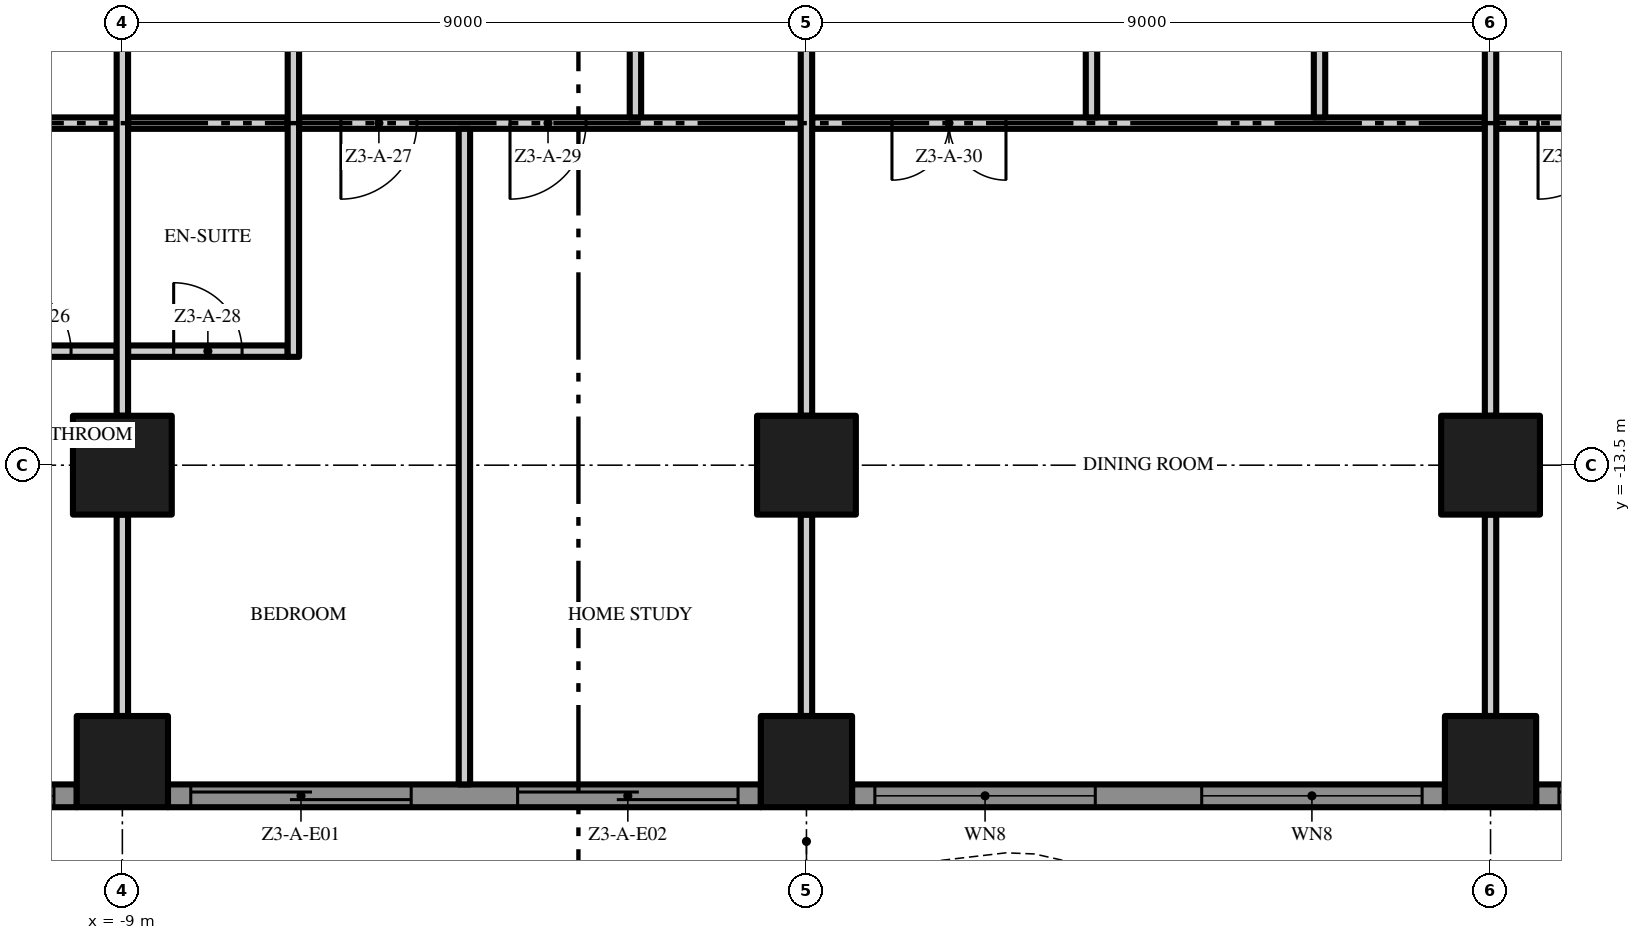
"""IFC4 building model, lengths in metres.
Left out: names, types, materials, properties, quantities, classifications, styles, units other than length and angle.
Written with IfcOpenShell. Run it as: python <this file> out.ifc"""

import sys

from ifc_helpers import new_model, si_unit, direction, frame, frame_2d, origin, origin_2d, place, context, subcontext, project, spatial, polyline, rectangle, outline, extrude, element, fill, save


model = new_model("IFC4")
c1 = context("Model", 3, precision=1e-05, world=origin(), true_north=direction((0.0, 1.0)))
c2 = subcontext(c1, "Body", "Model", "MODEL_VIEW")
j1 = project(units=[si_unit("LENGTHUNIT", "METRE"), si_unit("PLANEANGLEUNIT", "RADIAN")], contexts=[c1])
p1 = place(None, origin())
s1 = spatial("IfcSite", under=j1, at=p1, CompositionType="ELEMENT")
p2 = place(p1, origin())
s2 = spatial("IfcBuilding", under=s1, at=p2, CompositionType="ELEMENT")
p3 = place(p2, frame((0.0, 0.0, 125.0)))
s3 = spatial("IfcBuildingStorey", under=s2, at=p3, CompositionType="ELEMENT", Elevation=125.0)
p4 = place(p3, frame((-9.0, -13.5, 0.0), z_axis=(0.0, 0.0, 1.0), x_axis=(1.0, 0.0, 0.0)))
e1 = element("IfcColumn", 1, at=p4, inside=s3, PredefinedType="COLUMN", context=c2, shape_type="SweptSolid", body=[
    extrude(rectangle(XDim=1.3, YDim=1.3, at=origin_2d()), origin(), (0.0, 0.0, 1.0), 3.5),
])
p5 = place(p3, frame((-9.0, -17.4, 0.0), z_axis=(0.0, 0.0, 1.0), x_axis=(1.0, 0.0, 0.0)))
e2 = element("IfcColumn", 2, at=p5, inside=s3, PredefinedType="COLUMN", context=c2, shape_type="SweptSolid", body=[
    extrude(rectangle(XDim=1.2, YDim=1.2, at=origin_2d()), origin(), (0.0, 0.0, 1.0), 3.5),
])
p6 = place(p3, frame((0.0, -13.5, 0.0), z_axis=(0.0, 0.0, 1.0), x_axis=(1.0, 0.0, 0.0)))
e3 = element("IfcColumn", 3, at=p6, inside=s3, PredefinedType="COLUMN", context=c2, shape_type="SweptSolid", body=[
    extrude(rectangle(XDim=1.3, YDim=1.3, at=origin_2d()), origin(), (0.0, 0.0, 1.0), 3.5),
])
p7 = place(p3, frame((0.0, -17.4, 0.0), z_axis=(0.0, 0.0, 1.0), x_axis=(1.0, 0.0, 0.0)))
e4 = element("IfcColumn", 4, at=p7, inside=s3, PredefinedType="COLUMN", context=c2, shape_type="SweptSolid", body=[
    extrude(rectangle(XDim=1.2, YDim=1.2, at=origin_2d()), origin(), (0.0, 0.0, 1.0), 3.5),
])
p8 = place(p3, frame((9.0, -13.5, 0.0), z_axis=(0.0, 0.0, 1.0), x_axis=(1.0, 0.0, 0.0)))
e5 = element("IfcColumn", 5, at=p8, inside=s3, PredefinedType="COLUMN", context=c2, shape_type="SweptSolid", body=[
    extrude(rectangle(XDim=1.3, YDim=1.3, at=origin_2d()), origin(), (0.0, 0.0, 1.0), 3.5),
])
p9 = place(p3, frame((9.0, -17.4, 0.0), z_axis=(0.0, 0.0, 1.0), x_axis=(1.0, 0.0, 0.0)))
e6 = element("IfcColumn", 6, at=p9, inside=s3, PredefinedType="COLUMN", context=c2, shape_type="SweptSolid", body=[
    extrude(rectangle(XDim=1.2, YDim=1.2, at=origin_2d()), origin(), (0.0, 0.0, 1.0), 3.5),
])
p10 = place(p3, frame((-9.6, -17.85, 0.0), z_axis=(0.0, 0.0, 1.0), x_axis=(-1.0, 0.0, 0.0)))
e7 = element("IfcWall", 7, at=p10, inside=s3, PredefinedType="SOLIDWALL", context=c2, shape_type="SweptSolid", body=[
    extrude(rectangle(XDim=7.2, YDim=0.3, at=frame_2d((3.6, 0.0))), origin(), (0.0, 0.0, 1.0), 3.5),
])
p11 = place(p10, frame((4.6, 0.0, 0.45)))
e8 = element("IfcOpeningElement", 8, at=p11, cuts=e7, PredefinedType="OPENING", context=c2, shape_type="SweptSolid", body=[
    extrude(rectangle(XDim=2.3, YDim=2.65, at=frame_2d((1.15, 1.325))), frame((0.0, 0.16, 0.0), z_axis=(0.0, -1.0, 0.0), x_axis=(1.0, 0.0, 0.0)), (0.0, 0.0, 1.0), 0.32),
])
p12 = place(p10, frame((0.3, 0.0, 0.45)))
e9 = element("IfcOpeningElement", 9, at=p12, cuts=e7, PredefinedType="OPENING", context=c2, shape_type="SweptSolid", body=[
    extrude(rectangle(XDim=2.9, YDim=2.65, at=frame_2d((1.45, 1.325))), frame((0.0, 0.16, 0.0), z_axis=(0.0, -1.0, 0.0), x_axis=(1.0, 0.0, 0.0)), (0.0, 0.0, 1.0), 0.32),
])
p13 = place(p3, frame((-0.6, -17.85, 0.0), z_axis=(0.0, 0.0, 1.0), x_axis=(-1.0, 0.0, 0.0)))
e10 = element("IfcWall", 10, at=p13, inside=s3, PredefinedType="SOLIDWALL", context=c2, shape_type="SweptSolid", body=[
    extrude(rectangle(XDim=7.8, YDim=0.3, at=frame_2d((3.9, 0.0))), origin(), (0.0, 0.0, 1.0), 3.5),
])
p14 = place(p13, frame((4.6, 0.0, 0.0)))
e11 = element("IfcOpeningElement", 11, at=p14, cuts=e10, PredefinedType="OPENING", context=c2, shape_type="SweptSolid", body=[
    extrude(rectangle(XDim=2.9, YDim=2.4, at=frame_2d((1.45, 1.2))), frame((0.0, 0.16, 0.0), z_axis=(0.0, -1.0, 0.0), x_axis=(1.0, 0.0, 0.0)), (0.0, 0.0, 1.0), 0.32),
])
p15 = place(p13, frame((0.3, 0.0, 0.0)))
e12 = element("IfcOpeningElement", 12, at=p15, cuts=e10, PredefinedType="OPENING", context=c2, shape_type="SweptSolid", body=[
    extrude(rectangle(XDim=2.9, YDim=2.4, at=frame_2d((1.45, 1.2))), frame((0.0, 0.16, 0.0), z_axis=(0.0, -1.0, 0.0), x_axis=(1.0, 0.0, 0.0)), (0.0, 0.0, 1.0), 0.32),
])
p16 = place(p3, frame((8.4, -17.85, 0.0), z_axis=(0.0, 0.0, 1.0), x_axis=(-1.0, 0.0, 0.0)))
e13 = element("IfcWall", 13, at=p16, inside=s3, PredefinedType="SOLIDWALL", context=c2, shape_type="SweptSolid", body=[
    extrude(rectangle(XDim=7.8, YDim=0.3, at=frame_2d((3.9, 0.0))), origin(), (0.0, 0.0, 1.0), 3.5),
])
p17 = place(p16, frame((4.6, 0.0, 0.45)))
e14 = element("IfcOpeningElement", 14, at=p17, cuts=e13, PredefinedType="OPENING", context=c2, shape_type="SweptSolid", body=[
    extrude(rectangle(XDim=2.9, YDim=2.65, at=frame_2d((1.45, 1.325))), frame((0.0, 0.16, 0.0), z_axis=(0.0, -1.0, 0.0), x_axis=(1.0, 0.0, 0.0)), (0.0, 0.0, 1.0), 0.32),
])
p18 = place(p16, frame((0.3, 0.0, 0.45)))
e15 = element("IfcOpeningElement", 15, at=p18, cuts=e13, PredefinedType="OPENING", context=c2, shape_type="SweptSolid", body=[
    extrude(rectangle(XDim=2.9, YDim=2.65, at=frame_2d((1.45, 1.325))), frame((0.0, 0.16, 0.0), z_axis=(0.0, -1.0, 0.0), x_axis=(1.0, 0.0, 0.0)), (0.0, 0.0, 1.0), 0.32),
])
p19 = place(p3, frame((16.8, -17.85, 0.0), z_axis=(0.0, 0.0, 1.0), x_axis=(-1.0, 0.0, 0.0)))
e16 = element("IfcWall", 16, at=p19, inside=s3, PredefinedType="SOLIDWALL", context=c2, shape_type="SweptSolid", body=[
    extrude(rectangle(XDim=7.2, YDim=0.3, at=frame_2d((3.6, 0.0))), origin(), (0.0, 0.0, 1.0), 3.5),
])
p20 = place(p19, frame((4.0, 0.0, 0.0)))
e17 = element("IfcOpeningElement", 17, at=p20, cuts=e16, PredefinedType="OPENING", context=c2, shape_type="SweptSolid", body=[
    extrude(rectangle(XDim=2.9, YDim=2.4, at=frame_2d((1.45, 1.2))), frame((0.0, 0.16, 0.0), z_axis=(0.0, -1.0, 0.0), x_axis=(1.0, 0.0, 0.0)), (0.0, 0.0, 1.0), 0.32),
])
p21 = place(p19, frame((0.3, 0.0, 0.45)))
e18 = element("IfcOpeningElement", 18, at=p21, cuts=e16, PredefinedType="OPENING", context=c2, shape_type="SweptSolid", body=[
    extrude(rectangle(XDim=2.3, YDim=2.65, at=frame_2d((1.15, 1.325))), frame((0.0, 0.16, 0.0), z_axis=(0.0, -1.0, 0.0), x_axis=(1.0, 0.0, 0.0)), (0.0, 0.0, 1.0), 0.32),
])
p22 = place(p3, origin())
e19 = element("IfcWall", 19, at=p22, inside=s3, PredefinedType="USERDEFINED", context=c2, shape_type="SweptSolid", body=[
    extrude(outline(polyline([(-18.0, -20.649), (-16.5, -19.988), (-15.0, -19.255), (-13.5, -18.731), (-12.375, -18.6), (-12.0, -18.615), (-10.5, -18.951), (-9.0, -19.612), (-7.5, -20.345), (-6.0, -20.869), (-4.875, -21.0), (-4.5, -20.985), (-3.0, -20.649), (-1.5, -19.988), (0.0, -19.255), (1.5, -18.731), (2.625, -18.6), (3.0, -18.615), (4.5, -18.951), (6.0, -19.612), (7.5, -20.345), (9.0, -20.869), (10.125, -21.0), (10.5, -20.985), (12.0, -20.649), (13.5, -19.988), (15.0, -19.255), (16.5, -18.731), (17.625, -18.6), (18.0, -18.615), (18.01, -18.365), (17.615, -18.349), (16.444, -18.486), (14.904, -19.024), (13.395, -19.761), (11.921, -20.41), (10.467, -20.736), (10.135, -20.749), (9.056, -20.624), (7.596, -20.114), (6.105, -19.385), (4.579, -18.713), (3.033, -18.366), (2.615, -18.349), (1.444, -18.486), (-0.096, -19.024), (-1.605, -19.761), (-3.079, -20.41), (-4.533, -20.736), (-4.865, -20.749), (-5.944, -20.624), (-7.404, -20.114), (-8.895, -19.385), (-10.421, -18.713), (-11.967, -18.366), (-12.385, -18.349), (-13.556, -18.486), (-15.096, -19.024), (-16.605, -19.761), (-18.101, -20.42), (-18.0, -20.649)])), origin(), (0.0, 0.0, 1.0), 0.9),
])
p23 = place(p3, frame((-11.175, -12.0, 0.0), z_axis=(0.0, 0.0, 1.0), x_axis=(1.0, 0.0, 0.0)))
e20 = element("IfcWall", 20, at=p23, inside=s3, PredefinedType="PARTITIONING", context=c2, shape_type="SweptSolid", body=[
    extrude(rectangle(XDim=2.1, YDim=0.15, at=frame_2d((1.05, 0.0))), origin(), (0.0, 0.0, 1.0), 3.5),
])
p24 = place(p23, frame((0.6, 0.0, 0.0)))
e21 = element("IfcOpeningElement", 21, at=p24, cuts=e20, PredefinedType="OPENING", context=c2, shape_type="SweptSolid", body=[
    extrude(rectangle(XDim=0.9, YDim=2.1, at=frame_2d((0.45, 1.05))), frame((0.0, 0.085, 0.0), z_axis=(0.0, -1.0, 0.0), x_axis=(1.0, 0.0, 0.0)), (0.0, 0.0, 1.0), 0.17),
])
p25 = place(p3, frame((-8.925, -12.0, 0.0), z_axis=(0.0, 0.0, 1.0), x_axis=(1.0, 0.0, 0.0)))
e22 = element("IfcWall", 22, at=p25, inside=s3, PredefinedType="PARTITIONING", context=c2, shape_type="SweptSolid", body=[
    extrude(rectangle(XDim=2.1, YDim=0.15, at=frame_2d((1.05, 0.0))), origin(), (0.0, 0.0, 1.0), 3.5),
])
p26 = place(p25, frame((0.6, 0.0, 0.0)))
e23 = element("IfcOpeningElement", 23, at=p26, cuts=e22, PredefinedType="OPENING", context=c2, shape_type="SweptSolid", body=[
    extrude(rectangle(XDim=0.9, YDim=2.1, at=frame_2d((0.45, 1.05))), frame((0.0, 0.085, 0.0), z_axis=(0.0, -1.0, 0.0), x_axis=(1.0, 0.0, 0.0)), (0.0, 0.0, 1.0), 0.17),
])
for number, where, z_axis, x_axis in (
    (24, (-11.175, -9.0, 0.0), (0.0, 0.0, 1.0), (1.0, 0.0, 0.0)),
    (25, (-8.925, -9.0, 0.0), (0.0, 0.0, 1.0), (1.0, 0.0, 0.0)),
):
    element("IfcWall", number, at=place(p3, frame(where, z_axis=z_axis, x_axis=x_axis)), inside=s3, PredefinedType="PARTITIONING", context=c2, shape_type="SweptSolid", body=[
        extrude(rectangle(XDim=2.1, YDim=0.15, at=frame_2d((1.05, 0.0))), origin(), (0.0, 0.0, 1.0), 3.5),
    ])
p27 = place(p3, frame((-0.075, -9.0, 0.0), z_axis=(0.0, 0.0, 1.0), x_axis=(-1.0, 0.0, 0.0)))
e26 = element("IfcWall", 26, at=p27, inside=s3, PredefinedType="PARTITIONING", context=c2, shape_type="SweptSolid", body=[
    extrude(rectangle(XDim=6.6, YDim=0.15, at=frame_2d((3.3, 0.0))), origin(), (0.0, 0.0, 1.0), 3.5),
])
p28 = place(p27, frame((5.05, 0.0, 0.0)))
e27 = element("IfcOpeningElement", 27, at=p28, cuts=e26, PredefinedType="OPENING", context=c2, shape_type="SweptSolid", body=[
    extrude(rectangle(XDim=1.0, YDim=2.4, at=frame_2d((0.5, 1.2))), frame((0.0, 0.085, 0.0), z_axis=(0.0, -1.0, 0.0), x_axis=(1.0, 0.0, 0.0)), (0.0, 0.0, 1.0), 0.17),
])
p29 = place(p27, frame((2.825, 0.0, 0.0)))
e28 = element("IfcOpeningElement", 28, at=p29, cuts=e26, PredefinedType="OPENING", context=c2, shape_type="SweptSolid", body=[
    extrude(rectangle(XDim=1.0, YDim=2.4, at=frame_2d((0.5, 1.2))), frame((0.0, 0.085, 0.0), z_axis=(0.0, -1.0, 0.0), x_axis=(1.0, 0.0, 0.0)), (0.0, 0.0, 1.0), 0.17),
])
p30 = place(p3, frame((8.925, -9.0, 0.0), z_axis=(0.0, 0.0, 1.0), x_axis=(-1.0, 0.0, 0.0)))
e29 = element("IfcWall", 29, at=p30, inside=s3, PredefinedType="PARTITIONING", context=c2, shape_type="SweptSolid", body=[
    extrude(rectangle(XDim=8.85, YDim=0.15, at=frame_2d((4.425, 0.0))), origin(), (0.0, 0.0, 1.0), 3.5),
])
p31 = place(p30, frame((6.3, 0.0, 0.0)))
e30 = element("IfcOpeningElement", 30, at=p31, cuts=e29, PredefinedType="OPENING", context=c2, shape_type="SweptSolid", body=[
    extrude(rectangle(XDim=1.5, YDim=2.4, at=frame_2d((0.75, 1.2))), frame((0.0, 0.085, 0.0), z_axis=(0.0, -1.0, 0.0), x_axis=(1.0, 0.0, 0.0)), (0.0, 0.0, 1.0), 0.17),
])
p32 = place(p3, frame((11.175, -9.0, 0.0), z_axis=(0.0, 0.0, 1.0), x_axis=(-1.0, 0.0, 0.0)))
e31 = element("IfcWall", 31, at=p32, inside=s3, PredefinedType="PARTITIONING", context=c2, shape_type="SweptSolid", body=[
    extrude(rectangle(XDim=2.1, YDim=0.15, at=frame_2d((1.05, 0.0))), origin(), (0.0, 0.0, 1.0), 3.5),
])
p33 = place(p32, frame((0.55, 0.0, 0.0)))
e32 = element("IfcOpeningElement", 32, at=p33, cuts=e31, PredefinedType="OPENING", context=c2, shape_type="SweptSolid", body=[
    extrude(rectangle(XDim=1.0, YDim=2.4, at=frame_2d((0.5, 1.2))), frame((0.0, 0.085, 0.0), z_axis=(0.0, -1.0, 0.0), x_axis=(1.0, 0.0, 0.0)), (0.0, 0.0, 1.0), 0.17),
])
p34 = place(p3, frame((-9.0, -16.8, 0.0), z_axis=(0.0, 0.0, 1.0), x_axis=(0.0, 1.0, 0.0)))
e33 = element("IfcWall", 33, at=p34, inside=s3, PredefinedType="PARTITIONING", context=c2, shape_type="SweptSolid", body=[
    extrude(rectangle(XDim=2.65, YDim=0.15, at=frame_2d((1.325, 0.0))), origin(), (0.0, 0.0, 1.0), 3.5),
])
p35 = place(p3, frame((-9.0, -12.85, 0.0), z_axis=(0.0, 0.0, 1.0), x_axis=(0.0, 1.0, 0.0)))
e34 = element("IfcWall", 34, at=p35, inside=s3, PredefinedType="PARTITIONING", context=c2, shape_type="SweptSolid", body=[
    extrude(rectangle(XDim=7.7, YDim=0.15, at=frame_2d((3.85, 0.0))), origin(), (0.0, 0.0, 1.0), 3.5),
])
p36 = place(p3, frame((-6.75, -12.075, 0.0), z_axis=(0.0, 0.0, 1.0), x_axis=(0.0, 1.0, 0.0)))
e35 = element("IfcWall", 35, at=p36, inside=s3, PredefinedType="PARTITIONING", context=c2, shape_type="SweptSolid", body=[
    extrude(rectangle(XDim=7.65, YDim=0.15, at=frame_2d((3.825, 0.0))), origin(), (0.0, 0.0, 1.0), 3.5),
])
p37 = place(p3, frame((-4.5, -17.7, 0.0), z_axis=(0.0, 0.0, 1.0), x_axis=(0.0, 1.0, 0.0)))
e36 = element("IfcWall", 36, at=p37, inside=s3, PredefinedType="PARTITIONING", context=c2, shape_type="SweptSolid", body=[
    extrude(rectangle(XDim=8.625, YDim=0.15, at=frame_2d((4.312, 0.0))), origin(), (0.0, 0.0, 1.0), 3.5),
])
p38 = place(p3, frame((-2.25, -8.925, 0.0), z_axis=(0.0, 0.0, 1.0), x_axis=(0.0, 1.0, 0.0)))
e37 = element("IfcWall", 37, at=p38, inside=s3, PredefinedType="PARTITIONING", context=c2, shape_type="SweptSolid", body=[
    extrude(rectangle(XDim=4.5, YDim=0.15, at=frame_2d((2.25, 0.0))), origin(), (0.0, 0.0, 1.0), 3.5),
])
p39 = place(p3, frame((0.0, -16.8, 0.0), z_axis=(0.0, 0.0, 1.0), x_axis=(0.0, 1.0, 0.0)))
e38 = element("IfcWall", 38, at=p39, inside=s3, PredefinedType="PARTITIONING", context=c2, shape_type="SweptSolid", body=[
    extrude(rectangle(XDim=2.65, YDim=0.15, at=frame_2d((1.325, 0.0))), origin(), (0.0, 0.0, 1.0), 3.5),
])
p40 = place(p3, frame((0.0, -12.85, 0.0), z_axis=(0.0, 0.0, 1.0), x_axis=(0.0, 1.0, 0.0)))
e39 = element("IfcWall", 39, at=p40, inside=s3, PredefinedType="PARTITIONING", context=c2, shape_type="SweptSolid", body=[
    extrude(rectangle(XDim=7.7, YDim=0.15, at=frame_2d((3.85, 0.0))), origin(), (0.0, 0.0, 1.0), 3.5),
])
p41 = place(p3, frame((3.75, -8.925, 0.0), z_axis=(0.0, 0.0, 1.0), x_axis=(0.0, 1.0, 0.0)))
e40 = element("IfcWall", 40, at=p41, inside=s3, PredefinedType="PARTITIONING", context=c2, shape_type="SweptSolid", body=[
    extrude(rectangle(XDim=4.5, YDim=0.15, at=frame_2d((2.25, 0.0))), origin(), (0.0, 0.0, 1.0), 3.5),
])
p42 = place(p3, frame((6.75, -8.925, 0.0), z_axis=(0.0, 0.0, 1.0), x_axis=(0.0, 1.0, 0.0)))
e41 = element("IfcWall", 41, at=p42, inside=s3, PredefinedType="PARTITIONING", context=c2, shape_type="SweptSolid", body=[
    extrude(rectangle(XDim=4.35, YDim=0.15, at=frame_2d((2.175, 0.0))), origin(), (0.0, 0.0, 1.0), 3.5),
])
p43 = place(p3, frame((9.0, -16.8, 0.0), z_axis=(0.0, 0.0, 1.0), x_axis=(0.0, 1.0, 0.0)))
e42 = element("IfcWall", 42, at=p43, inside=s3, PredefinedType="PARTITIONING", context=c2, shape_type="SweptSolid", body=[
    extrude(rectangle(XDim=2.65, YDim=0.15, at=frame_2d((1.325, 0.0))), origin(), (0.0, 0.0, 1.0), 3.5),
])
p44 = place(p3, frame((9.0, -12.85, 0.0), z_axis=(0.0, 0.0, 1.0), x_axis=(0.0, 1.0, 0.0)))
e43 = element("IfcWall", 43, at=p44, inside=s3, PredefinedType="PARTITIONING", context=c2, shape_type="SweptSolid", body=[
    extrude(rectangle(XDim=7.7, YDim=0.15, at=frame_2d((3.85, 0.0))), origin(), (0.0, 0.0, 1.0), 3.5),
])
p45 = place(p12, origin())
e44 = element("IfcWindow", 44, at=p45, inside=s3, PartitioningType="SINGLE_PANEL", PredefinedType="WINDOW", context=c2, shape_type="SweptSolid", body=[
    extrude(rectangle(XDim=2.9, YDim=2.65, at=frame_2d((1.45, 1.325))), frame((0.0, 0.03, 0.0), z_axis=(0.0, -1.0, 0.0), x_axis=(1.0, 0.0, 0.0)), (0.0, 0.0, 1.0), 0.06),
])
fill(e9, e44)
p46 = place(p14, origin())
e45 = element("IfcDoor", 45, at=p46, inside=s3, OperationType="SINGLE_SWING_LEFT", PredefinedType="DOOR", context=c2, shape_type="SweptSolid", body=[
    extrude(rectangle(XDim=2.9, YDim=2.4, at=frame_2d((1.45, 1.2))), frame((0.0, 0.025, 0.0), z_axis=(0.0, -1.0, 0.0), x_axis=(1.0, 0.0, 0.0)), (0.0, 0.0, 1.0), 0.05),
])
fill(e11, e45)
p47 = place(p15, origin())
e46 = element("IfcDoor", 46, at=p47, inside=s3, OperationType="SINGLE_SWING_LEFT", PredefinedType="DOOR", context=c2, shape_type="SweptSolid", body=[
    extrude(rectangle(XDim=2.9, YDim=2.4, at=frame_2d((1.45, 1.2))), frame((0.0, 0.025, 0.0), z_axis=(0.0, -1.0, 0.0), x_axis=(1.0, 0.0, 0.0)), (0.0, 0.0, 1.0), 0.05),
])
fill(e12, e46)
p48 = place(p17, origin())
e47 = element("IfcWindow", 47, at=p48, inside=s3, PartitioningType="SINGLE_PANEL", PredefinedType="WINDOW", context=c2, shape_type="SweptSolid", body=[
    extrude(rectangle(XDim=2.9, YDim=2.65, at=frame_2d((1.45, 1.325))), frame((0.0, 0.03, 0.0), z_axis=(0.0, -1.0, 0.0), x_axis=(1.0, 0.0, 0.0)), (0.0, 0.0, 1.0), 0.06),
])
fill(e14, e47)
p49 = place(p18, origin())
e48 = element("IfcWindow", 48, at=p49, inside=s3, PartitioningType="SINGLE_PANEL", PredefinedType="WINDOW", context=c2, shape_type="SweptSolid", body=[
    extrude(rectangle(XDim=2.9, YDim=2.65, at=frame_2d((1.45, 1.325))), frame((0.0, 0.03, 0.0), z_axis=(0.0, -1.0, 0.0), x_axis=(1.0, 0.0, 0.0)), (0.0, 0.0, 1.0), 0.06),
])
fill(e15, e48)
p50 = place(p20, origin())
e49 = element("IfcDoor", 49, at=p50, inside=s3, OperationType="SINGLE_SWING_LEFT", PredefinedType="DOOR", context=c2, shape_type="SweptSolid", body=[
    extrude(rectangle(XDim=2.9, YDim=2.4, at=frame_2d((1.45, 1.2))), frame((0.0, 0.025, 0.0), z_axis=(0.0, -1.0, 0.0), x_axis=(1.0, 0.0, 0.0)), (0.0, 0.0, 1.0), 0.05),
])
fill(e17, e49)
p51 = place(p24, origin())
e50 = element("IfcDoor", 50, at=p51, inside=s3, OperationType="SINGLE_SWING_LEFT", PredefinedType="DOOR", context=c2, shape_type="SweptSolid", body=[
    extrude(rectangle(XDim=0.9, YDim=2.1, at=frame_2d((0.45, 1.05))), frame((0.0, 0.025, 0.0), z_axis=(0.0, -1.0, 0.0), x_axis=(1.0, 0.0, 0.0)), (0.0, 0.0, 1.0), 0.05),
])
fill(e21, e50)
p52 = place(p28, origin())
e51 = element("IfcDoor", 51, at=p52, inside=s3, OperationType="SINGLE_SWING_RIGHT", PredefinedType="DOOR", context=c2, shape_type="SweptSolid", body=[
    extrude(rectangle(XDim=1.0, YDim=2.4, at=frame_2d((0.5, 1.2))), frame((0.0, 0.025, 0.0), z_axis=(0.0, -1.0, 0.0), x_axis=(1.0, 0.0, 0.0)), (0.0, 0.0, 1.0), 0.05),
])
fill(e27, e51)
p53 = place(p26, origin())
e52 = element("IfcDoor", 52, at=p53, inside=s3, OperationType="SINGLE_SWING_LEFT", PredefinedType="DOOR", context=c2, shape_type="SweptSolid", body=[
    extrude(rectangle(XDim=0.9, YDim=2.1, at=frame_2d((0.45, 1.05))), frame((0.0, 0.025, 0.0), z_axis=(0.0, -1.0, 0.0), x_axis=(1.0, 0.0, 0.0)), (0.0, 0.0, 1.0), 0.05),
])
fill(e23, e52)
p54 = place(p29, origin())
e53 = element("IfcDoor", 53, at=p54, inside=s3, OperationType="SINGLE_SWING_RIGHT", PredefinedType="DOOR", context=c2, shape_type="SweptSolid", body=[
    extrude(rectangle(XDim=1.0, YDim=2.4, at=frame_2d((0.5, 1.2))), frame((0.0, 0.025, 0.0), z_axis=(0.0, -1.0, 0.0), x_axis=(1.0, 0.0, 0.0)), (0.0, 0.0, 1.0), 0.05),
])
fill(e28, e53)
p55 = place(p31, origin())
e54 = element("IfcDoor", 54, at=p55, inside=s3, OperationType="DOUBLE_DOOR_SINGLE_SWING", PredefinedType="DOOR", context=c2, shape_type="SweptSolid", body=[
    extrude(rectangle(XDim=1.5, YDim=2.4, at=frame_2d((0.75, 1.2))), frame((0.0, 0.025, 0.0), z_axis=(0.0, -1.0, 0.0), x_axis=(1.0, 0.0, 0.0)), (0.0, 0.0, 1.0), 0.05),
])
fill(e30, e54)
p56 = place(p33, origin())
e55 = element("IfcDoor", 55, at=p56, inside=s3, OperationType="SINGLE_SWING_RIGHT", PredefinedType="DOOR", context=c2, shape_type="SweptSolid", body=[
    extrude(rectangle(XDim=1.0, YDim=2.4, at=frame_2d((0.5, 1.2))), frame((0.0, 0.025, 0.0), z_axis=(0.0, -1.0, 0.0), x_axis=(1.0, 0.0, 0.0)), (0.0, 0.0, 1.0), 0.05),
])
fill(e32, e55)
save(model, sys.argv[1])
